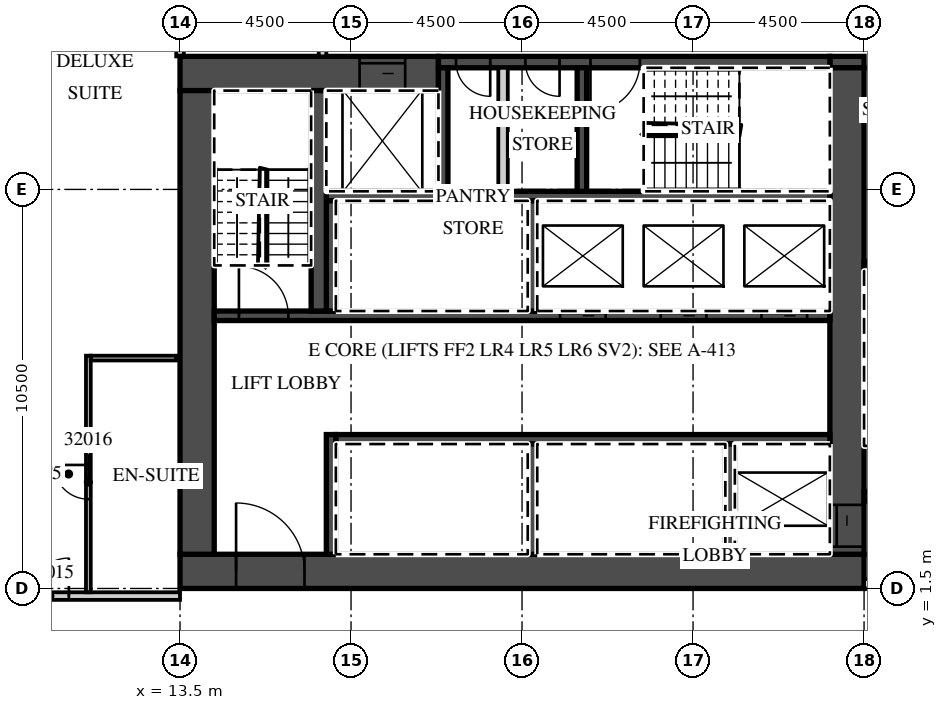
"""IFC4 building model, lengths in metres.
Left out: names, types, materials, properties, quantities, classifications, styles, units other than length and angle.
Written with IfcOpenShell. Run it as: python <this file> out.ifc"""

import sys

from ifc_helpers import new_model, si_unit, direction, frame, frame_2d, origin, place, context, subcontext, project, spatial, rectangle, extrude, element, fill, save


model = new_model("IFC4")
c1 = context("Model", 3, precision=1e-05, world=origin(), true_north=direction((0.0, 1.0)))
c2 = subcontext(c1, "Body", "Model", "MODEL_VIEW")
j1 = project(units=[si_unit("LENGTHUNIT", "METRE"), si_unit("PLANEANGLEUNIT", "RADIAN")], contexts=[c1])
p1 = place(None, origin())
s1 = spatial("IfcSite", under=j1, at=p1, CompositionType="ELEMENT")
p2 = place(p1, origin())
s2 = spatial("IfcBuilding", under=s1, at=p2, CompositionType="ELEMENT")
p3 = place(p2, frame((0.0, 0.0, 140.5)))
s3 = spatial("IfcBuildingStorey", under=s2, at=p3, CompositionType="ELEMENT", Elevation=140.5)
p4 = place(p3, frame((13.5, 15.5, 0.0), z_axis=(0.0, 0.0, 1.0), x_axis=(0.0, 1.0, 0.0)))
e1 = element("IfcWall", 1, at=p4, inside=s3, PredefinedType="PARTITIONING", context=c2, shape_type="SweptSolid", body=[
    extrude(rectangle(XDim=7.162, YDim=0.2, at=frame_2d((3.581, 0.0))), origin(), (0.0, 0.0, 1.0), 3.02),
])
p5 = place(p3, frame((-39.316, 1.3, 0.0), z_axis=(0.0, 0.0, 1.0), x_axis=(1.0, 0.0, 0.0)))
e2 = element("IfcWall", 2, at=p5, inside=s3, PredefinedType="PARTITIONING", context=c2, shape_type="SweptSolid", body=[
    extrude(rectangle(XDim=52.816, YDim=0.2, at=frame_2d((26.408, 0.0))), origin(), (0.0, 0.0, 1.0), 3.02),
])
p6 = place(p5, frame((0.15, 0.0, 0.0)))
e3 = element("IfcOpeningElement", 3, at=p6, cuts=e2, PredefinedType="OPENING", context=c2, shape_type="SweptSolid", body=[
    extrude(rectangle(XDim=0.9, YDim=2.1, at=frame_2d((0.45, 1.05))), frame((0.0, 0.11, 0.0), z_axis=(0.0, -1.0, 0.0), x_axis=(1.0, 0.0, 0.0)), (0.0, 0.0, 1.0), 0.22),
])
p7 = place(p5, frame((8.679, 0.0, 0.0)))
e4 = element("IfcOpeningElement", 4, at=p7, cuts=e2, PredefinedType="OPENING", context=c2, shape_type="SweptSolid", body=[
    extrude(rectangle(XDim=1.2, YDim=2.1, at=frame_2d((0.6, 1.05))), frame((0.0, 0.11, 0.0), z_axis=(0.0, -1.0, 0.0), x_axis=(1.0, 0.0, 0.0)), (0.0, 0.0, 1.0), 0.22),
])
p8 = place(p5, frame((17.678, 0.0, 0.0)))
e5 = element("IfcOpeningElement", 5, at=p8, cuts=e2, PredefinedType="OPENING", context=c2, shape_type="SweptSolid", body=[
    extrude(rectangle(XDim=1.2, YDim=2.1, at=frame_2d((0.6, 1.05))), frame((0.0, 0.11, 0.0), z_axis=(0.0, -1.0, 0.0), x_axis=(1.0, 0.0, 0.0)), (0.0, 0.0, 1.0), 0.22),
])
p9 = place(p5, frame((23.754, 0.0, 0.0)))
e6 = element("IfcOpeningElement", 6, at=p9, cuts=e2, PredefinedType="OPENING", context=c2, shape_type="SweptSolid", body=[
    extrude(rectangle(XDim=1.2, YDim=2.1, at=frame_2d((0.6, 1.05))), frame((0.0, 0.11, 0.0), z_axis=(0.0, -1.0, 0.0), x_axis=(1.0, 0.0, 0.0)), (0.0, 0.0, 1.0), 0.22),
])
p10 = place(p5, frame((30.891, 0.0, 0.0)))
e7 = element("IfcOpeningElement", 7, at=p10, cuts=e2, PredefinedType="OPENING", context=c2, shape_type="SweptSolid", body=[
    extrude(rectangle(XDim=1.0, YDim=2.1, at=frame_2d((0.5, 1.05))), frame((0.0, 0.11, 0.0), z_axis=(0.0, -1.0, 0.0), x_axis=(1.0, 0.0, 0.0)), (0.0, 0.0, 1.0), 0.22),
])
p11 = place(p5, frame((37.741, 0.0, 0.0)))
e8 = element("IfcOpeningElement", 8, at=p11, cuts=e2, PredefinedType="OPENING", context=c2, shape_type="SweptSolid", body=[
    extrude(rectangle(XDim=1.0, YDim=2.1, at=frame_2d((0.5, 1.05))), frame((0.0, 0.11, 0.0), z_axis=(0.0, -1.0, 0.0), x_axis=(1.0, 0.0, 0.0)), (0.0, 0.0, 1.0), 0.22),
])
p12 = place(p5, frame((41.754, 0.0, 0.0)))
e9 = element("IfcOpeningElement", 9, at=p12, cuts=e2, PredefinedType="OPENING", context=c2, shape_type="SweptSolid", body=[
    extrude(rectangle(XDim=1.2, YDim=2.1, at=frame_2d((0.6, 1.05))), frame((0.0, 0.11, 0.0), z_axis=(0.0, -1.0, 0.0), x_axis=(1.0, 0.0, 0.0)), (0.0, 0.0, 1.0), 0.22),
])
p13 = place(p5, frame((48.891, 0.0, 0.0)))
e10 = element("IfcOpeningElement", 10, at=p13, cuts=e2, PredefinedType="OPENING", context=c2, shape_type="SweptSolid", body=[
    extrude(rectangle(XDim=1.0, YDim=2.1, at=frame_2d((0.5, 1.05))), frame((0.0, 0.11, 0.0), z_axis=(0.0, -1.0, 0.0), x_axis=(1.0, 0.0, 0.0)), (0.0, 0.0, 1.0), 0.22),
])
p14 = place(p3, frame((11.088, 1.4, 0.0), z_axis=(0.0, 0.0, 1.0), x_axis=(0.0, 1.0, 0.0)))
e11 = element("IfcWall", 11, at=p14, inside=s3, PredefinedType="PARTITIONING", context=c2, shape_type="SweptSolid", body=[
    extrude(rectangle(XDim=6.225, YDim=0.125, at=frame_2d((3.113, 0.0))), origin(), (0.0, 0.0, 1.0), 3.02),
])
p15 = place(p14, frame((2.45, 0.0, 0.0)))
e12 = element("IfcOpeningElement", 12, at=p15, cuts=e11, PredefinedType="OPENING", context=c2, shape_type="SweptSolid", body=[
    extrude(rectangle(XDim=0.9, YDim=2.1, at=frame_2d((0.45, 1.05))), frame((0.0, 0.073, 0.0), z_axis=(0.0, -1.0, 0.0), x_axis=(1.0, 0.0, 0.0)), (0.0, 0.0, 1.0), 0.145),
])
p16 = place(p3, frame((11.15, 7.562, 0.0), z_axis=(0.0, 0.0, 1.0), x_axis=(1.0, 0.0, 0.0)))
e13 = element("IfcWall", 13, at=p16, inside=s3, PredefinedType="PARTITIONING", context=c2, shape_type="SweptSolid", body=[
    extrude(rectangle(XDim=2.25, YDim=0.125, at=frame_2d((1.125, 0.0))), origin(), (0.0, 0.0, 1.0), 3.02),
])
p17 = place(p3, frame((13.5, 1.95, 0.0), z_axis=(0.0, 0.0, 1.0), x_axis=(1.0, 0.0, 0.0)))
e14 = element("IfcWall", 14, at=p17, inside=s3, PredefinedType="SHEAR", context=c2, shape_type="SweptSolid", body=[
    extrude(rectangle(XDim=18.0, YDim=0.9, at=frame_2d((9.0, 0.0))), origin(), (0.0, 0.0, 1.0), 3.02),
])
p18 = place(p17, frame((1.475, 0.0, 0.0)))
e15 = element("IfcOpeningElement", 15, at=p18, cuts=e14, PredefinedType="OPENING", context=c2, shape_type="SweptSolid", body=[
    extrude(rectangle(XDim=1.8, YDim=2.1, at=frame_2d((0.9, 1.05))), frame((0.0, 0.46, 0.0), z_axis=(0.0, -1.0, 0.0), x_axis=(1.0, 0.0, 0.0)), (0.0, 0.0, 1.0), 0.92),
])
p19 = place(p3, frame((13.5, 15.05, 0.0), z_axis=(0.0, 0.0, 1.0), x_axis=(1.0, 0.0, 0.0)))
e16 = element("IfcWall", 16, at=p19, inside=s3, PredefinedType="SHEAR", context=c2, shape_type="SweptSolid", body=[
    extrude(rectangle(XDim=6.8, YDim=0.9, at=frame_2d((3.4, 0.0))), origin(), (0.0, 0.0, 1.0), 3.02),
])
p20 = place(p19, frame((4.725, 0.0, 0.0)))
e17 = element("IfcOpeningElement", 17, at=p20, cuts=e16, PredefinedType="OPENING", context=c2, shape_type="SweptSolid", body=[
    extrude(rectangle(XDim=1.2, YDim=2.1, at=frame_2d((0.6, 1.05))), frame((0.0, 0.46, 0.0), z_axis=(0.0, -1.0, 0.0), x_axis=(1.0, 0.0, 0.0)), (0.0, 0.0, 1.0), 0.92),
])
p21 = place(p3, frame((30.6, 15.35, 0.0), z_axis=(0.0, 0.0, 1.0), x_axis=(1.0, 0.0, 0.0)))
e18 = element("IfcWall", 18, at=p21, inside=s3, PredefinedType="SHEAR", context=c2, shape_type="SweptSolid", body=[
    extrude(rectangle(XDim=0.9, YDim=0.3, at=frame_2d((0.45, 0.0))), origin(), (0.0, 0.0, 1.0), 3.02),
])
p22 = place(p3, frame((20.3, 15.35, 0.0), z_axis=(0.0, 0.0, 1.0), x_axis=(1.0, 0.0, 0.0)))
e19 = element("IfcWall", 19, at=p22, inside=s3, PredefinedType="SHEAR", context=c2, shape_type="SweptSolid", body=[
    extrude(rectangle(XDim=10.3, YDim=0.3, at=frame_2d((5.15, 0.0))), origin(), (0.0, 0.0, 1.0), 3.02),
])
p23 = place(p22, frame((4.0, 0.0, 0.0)))
e20 = element("IfcOpeningElement", 20, at=p23, cuts=e19, PredefinedType="OPENING", context=c2, shape_type="SweptSolid", body=[
    extrude(rectangle(XDim=1.3, YDim=2.1, at=frame_2d((0.65, 1.05))), frame((0.0, 0.16, 0.0), z_axis=(0.0, -1.0, 0.0), x_axis=(1.0, 0.0, 0.0)), (0.0, 0.0, 1.0), 0.32),
])
p24 = place(p22, frame((2.288, 0.0, 0.0)))
e21 = element("IfcOpeningElement", 21, at=p24, cuts=e19, PredefinedType="OPENING", context=c2, shape_type="SweptSolid", body=[
    extrude(rectangle(XDim=0.9, YDim=2.1, at=frame_2d((0.45, 1.05))), frame((0.0, 0.16, 0.0), z_axis=(0.0, -1.0, 0.0), x_axis=(1.0, 0.0, 0.0)), (0.0, 0.0, 1.0), 0.32),
])
p25 = place(p22, frame((0.462, 0.0, 0.0)))
e22 = element("IfcOpeningElement", 22, at=p25, cuts=e19, PredefinedType="OPENING", context=c2, shape_type="SweptSolid", body=[
    extrude(rectangle(XDim=0.9, YDim=2.1, at=frame_2d((0.45, 1.05))), frame((0.0, 0.16, 0.0), z_axis=(0.0, -1.0, 0.0), x_axis=(1.0, 0.0, 0.0)), (0.0, 0.0, 1.0), 0.32),
])
p26 = place(p3, frame((31.05, 2.4, 0.0), z_axis=(0.0, 0.0, 1.0), x_axis=(0.0, 1.0, 0.0)))
e23 = element("IfcWall", 23, at=p26, inside=s3, PredefinedType="SHEAR", context=c2, shape_type="SweptSolid", body=[
    extrude(rectangle(XDim=12.8, YDim=0.9, at=frame_2d((6.4, 0.0))), origin(), (0.0, 0.0, 1.0), 3.02),
])
p27 = place(p26, frame((0.2, 0.0, 0.0)))
e24 = element("IfcOpeningElement", 24, at=p27, cuts=e23, PredefinedType="OPENING", context=c2, shape_type="SweptSolid", body=[
    extrude(rectangle(XDim=1.1, YDim=2.1, at=frame_2d((0.55, 1.05))), frame((0.0, 0.46, 0.0), z_axis=(0.0, -1.0, 0.0), x_axis=(1.0, 0.0, 0.0)), (0.0, 0.0, 1.0), 0.92),
])
p28 = place(p3, frame((13.95, 2.4, 0.0), z_axis=(0.0, 0.0, 1.0), x_axis=(0.0, 1.0, 0.0)))
e25 = element("IfcWall", 25, at=p28, inside=s3, PredefinedType="SHEAR", context=c2, shape_type="SweptSolid", body=[
    extrude(rectangle(XDim=12.2, YDim=0.9, at=frame_2d((6.1, 0.0))), origin(), (0.0, 0.0, 1.0), 3.02),
])
p29 = place(p3, frame((17.6, 5.425, 0.0), z_axis=(0.0, 0.0, 1.0), x_axis=(1.0, 0.0, 0.0)))
e26 = element("IfcWall", 26, at=p29, inside=s3, PredefinedType="SHEAR", context=c2, shape_type="SweptSolid", body=[
    extrude(rectangle(XDim=13.0, YDim=0.25, at=frame_2d((6.5, 0.0))), origin(), (0.0, 0.0, 1.0), 3.02),
])
p30 = place(p3, frame((17.475, 2.4, 0.0), z_axis=(0.0, 0.0, 1.0), x_axis=(0.0, 1.0, 0.0)))
e27 = element("IfcWall", 27, at=p30, inside=s3, PredefinedType="SHEAR", context=c2, shape_type="SweptSolid", body=[
    extrude(rectangle(XDim=3.15, YDim=0.25, at=frame_2d((1.575, 0.0))), origin(), (0.0, 0.0, 1.0), 3.02),
])
for number, where, z_axis, x_axis in (
    (28, (27.975, 2.4, 0.0), (0.0, 0.0, 1.0), (0.0, 1.0, 0.0)),
    (29, (22.775, 2.4, 0.0), (0.0, 0.0, 1.0), (0.0, 1.0, 0.0)),
):
    element("IfcWall", number, at=place(p3, frame(where, z_axis=z_axis, x_axis=x_axis)), inside=s3, PredefinedType="SHEAR", context=c2, shape_type="SweptSolid", body=[
        extrude(rectangle(XDim=2.9, YDim=0.25, at=frame_2d((1.45, 0.0))), origin(), (0.0, 0.0, 1.0), 3.02),
    ])
p31 = place(p3, frame((14.4, 8.675, 0.0), z_axis=(0.0, 0.0, 1.0), x_axis=(1.0, 0.0, 0.0)))
e30 = element("IfcWall", 30, at=p31, inside=s3, PredefinedType="SHEAR", context=c2, shape_type="SweptSolid", body=[
    extrude(rectangle(XDim=16.2, YDim=0.25, at=frame_2d((8.1, 0.0))), origin(), (0.0, 0.0, 1.0), 3.02),
])
p32 = place(p31, frame((14.4, 0.0, 0.0)))
e31 = element("IfcOpeningElement", 31, at=p32, cuts=e30, PredefinedType="OPENING", context=c2, shape_type="SweptSolid", body=[
    extrude(rectangle(XDim=1.2, YDim=2.1, at=frame_2d((0.6, 1.05))), frame((0.0, 0.135, 0.0), z_axis=(0.0, -1.0, 0.0), x_axis=(1.0, 0.0, 0.0)), (0.0, 0.0, 1.0), 0.27),
])
p33 = place(p31, frame((11.75, 0.0, 0.0)))
e32 = element("IfcOpeningElement", 32, at=p33, cuts=e30, PredefinedType="OPENING", context=c2, shape_type="SweptSolid", body=[
    extrude(rectangle(XDim=1.2, YDim=2.1, at=frame_2d((0.6, 1.05))), frame((0.0, 0.135, 0.0), z_axis=(0.0, -1.0, 0.0), x_axis=(1.0, 0.0, 0.0)), (0.0, 0.0, 1.0), 0.27),
])
p34 = place(p31, frame((9.1, 0.0, 0.0)))
e33 = element("IfcOpeningElement", 33, at=p34, cuts=e30, PredefinedType="OPENING", context=c2, shape_type="SweptSolid", body=[
    extrude(rectangle(XDim=1.2, YDim=2.1, at=frame_2d((0.6, 1.05))), frame((0.0, 0.135, 0.0), z_axis=(0.0, -1.0, 0.0), x_axis=(1.0, 0.0, 0.0)), (0.0, 0.0, 1.0), 0.27),
])
p35 = place(p31, frame((0.65, 0.0, 0.0)))
e34 = element("IfcOpeningElement", 34, at=p35, cuts=e30, PredefinedType="OPENING", context=c2, shape_type="SweptSolid", body=[
    extrude(rectangle(XDim=1.3, YDim=2.1, at=frame_2d((0.65, 1.05))), frame((0.0, 0.135, 0.0), z_axis=(0.0, -1.0, 0.0), x_axis=(1.0, 0.0, 0.0)), (0.0, 0.0, 1.0), 0.27),
])
p36 = place(p3, frame((17.35, 11.825, 0.0), z_axis=(0.0, 0.0, 1.0), x_axis=(1.0, 0.0, 0.0)))
e35 = element("IfcWall", 35, at=p36, inside=s3, PredefinedType="SHEAR", context=c2, shape_type="SweptSolid", body=[
    extrude(rectangle(XDim=13.25, YDim=0.25, at=frame_2d((6.625, 0.0))), origin(), (0.0, 0.0, 1.0), 3.02),
])
for number, where, z_axis, x_axis in (
    (36, (17.475, 8.8, 0.0), (0.0, 0.0, 1.0), (0.0, 1.0, 0.0)),
    (37, (22.775, 8.8, 0.0), (0.0, 0.0, 1.0), (0.0, 1.0, 0.0)),
):
    element("IfcWall", number, at=place(p3, frame(where, z_axis=z_axis, x_axis=x_axis)), inside=s3, PredefinedType="SHEAR", context=c2, shape_type="SweptSolid", body=[
        extrude(rectangle(XDim=2.9, YDim=0.25, at=frame_2d((1.45, 0.0))), origin(), (0.0, 0.0, 1.0), 3.02),
    ])
p37 = place(p3, frame((17.15, 8.8, 0.0), z_axis=(0.0, 0.0, 1.0), x_axis=(0.0, 1.0, 0.0)))
e38 = element("IfcWall", 38, at=p37, inside=s3, PredefinedType="SHEAR", context=c2, shape_type="SweptSolid", body=[
    extrude(rectangle(XDim=5.8, YDim=0.4, at=frame_2d((2.9, 0.0))), origin(), (0.0, 0.0, 1.0), 3.02),
])
for number, where, z_axis, x_axis in (
    (39, (20.425, 11.95, 0.0), (0.0, 0.0, 1.0), (0.0, 1.0, 0.0)),
    (40, (24.075, 11.95, 0.0), (0.0, 0.0, 1.0), (0.0, 1.0, 0.0)),
):
    element("IfcWall", number, at=place(p3, frame(where, z_axis=z_axis, x_axis=x_axis)), inside=s3, PredefinedType="SHEAR", context=c2, shape_type="SweptSolid", body=[
        extrude(rectangle(XDim=3.25, YDim=0.25, at=frame_2d((1.625, 0.0))), origin(), (0.0, 0.0, 1.0), 3.02),
    ])
p38 = place(p3, frame((22.0, 11.95, 0.0), z_axis=(0.0, 0.0, 1.0), x_axis=(0.0, 1.0, 0.0)))
e41 = element("IfcWall", 41, at=p38, inside=s3, PredefinedType="PARTITIONING", context=c2, shape_type="SweptSolid", body=[
    extrude(rectangle(XDim=3.25, YDim=0.25, at=frame_2d((1.625, 0.0))), origin(), (0.0, 0.0, 1.0), 3.02),
])
p39 = place(p3, frame((31.5, 1.625, 0.0), z_axis=(0.0, 0.0, 1.0), x_axis=(1.0, 0.0, 0.0)))
e42 = element("IfcWall", 42, at=p39, inside=s3, PredefinedType="PARTITIONING", context=c2, shape_type="SweptSolid", body=[
    extrude(rectangle(XDim=15.65, YDim=0.25, at=frame_2d((7.825, 0.0))), origin(), (0.0, 0.0, 1.0), 3.02),
])
p40 = place(p39, frame((0.625, 0.0, 0.0)))
e43 = element("IfcOpeningElement", 43, at=p40, cuts=e42, PredefinedType="OPENING", context=c2, shape_type="SweptSolid", body=[
    extrude(rectangle(XDim=1.3, YDim=2.1, at=frame_2d((0.65, 1.05))), frame((0.0, 0.135, 0.0), z_axis=(0.0, -1.0, 0.0), x_axis=(1.0, 0.0, 0.0)), (0.0, 0.0, 1.0), 0.27),
])
p41 = place(p39, frame((3.25, 0.0, 0.0)))
e44 = element("IfcOpeningElement", 44, at=p41, cuts=e42, PredefinedType="OPENING", context=c2, shape_type="SweptSolid", body=[
    extrude(rectangle(XDim=1.1, YDim=2.1, at=frame_2d((0.55, 1.05))), frame((0.0, 0.135, 0.0), z_axis=(0.0, -1.0, 0.0), x_axis=(1.0, 0.0, 0.0)), (0.0, 0.0, 1.0), 0.27),
])
p42 = place(p3, frame((31.5, 3.925, 0.0), z_axis=(0.0, 0.0, 1.0), x_axis=(1.0, 0.0, 0.0)))
e45 = element("IfcWall", 45, at=p42, inside=s3, PredefinedType="SHEAR", context=c2, shape_type="SweptSolid", body=[
    extrude(rectangle(XDim=2.55, YDim=0.25, at=frame_2d((1.275, 0.0))), origin(), (0.0, 0.0, 1.0), 3.02),
])
p43 = place(p42, frame((0.625, 0.0, 0.0)))
e46 = element("IfcOpeningElement", 46, at=p43, cuts=e45, PredefinedType="OPENING", context=c2, shape_type="SweptSolid", body=[
    extrude(rectangle(XDim=1.3, YDim=2.1, at=frame_2d((0.65, 1.05))), frame((0.0, 0.135, 0.0), z_axis=(0.0, -1.0, 0.0), x_axis=(1.0, 0.0, 0.0)), (0.0, 0.0, 1.0), 0.27),
])
p44 = place(p3, frame((31.5, 9.975, 0.0), z_axis=(0.0, 0.0, 1.0), x_axis=(1.0, 0.0, 0.0)))
e47 = element("IfcWall", 47, at=p44, inside=s3, PredefinedType="SHEAR", context=c2, shape_type="SweptSolid", body=[
    extrude(rectangle(XDim=2.55, YDim=0.25, at=frame_2d((1.275, 0.0))), origin(), (0.0, 0.0, 1.0), 3.02),
])
p45 = place(p3, frame((17.25, 15.5, 0.0), z_axis=(0.0, 0.0, 1.0), x_axis=(0.0, 1.0, 0.0)))
e48 = element("IfcWall", 48, at=p45, inside=s3, PredefinedType="PARTITIONING", context=c2, shape_type="SweptSolid", body=[
    extrude(rectangle(XDim=2.2, YDim=0.2, at=frame_2d((1.1, 0.0))), origin(), (0.0, 0.0, 1.0), 3.02),
])
p46 = place(p13, origin())
e49 = element("IfcDoor", 49, at=p46, inside=s3, OperationType="SINGLE_SWING_RIGHT", PredefinedType="DOOR", context=c2, shape_type="SweptSolid", body=[
    extrude(rectangle(XDim=1.0, YDim=2.1, at=frame_2d((0.5, 1.05))), frame((0.0, 0.025, 0.0), z_axis=(0.0, -1.0, 0.0), x_axis=(1.0, 0.0, 0.0)), (0.0, 0.0, 1.0), 0.05),
])
fill(e10, e49)
p47 = place(p15, origin())
e50 = element("IfcDoor", 50, at=p47, inside=s3, OperationType="SINGLE_SWING_RIGHT", PredefinedType="DOOR", context=c2, shape_type="SweptSolid", body=[
    extrude(rectangle(XDim=0.9, YDim=2.1, at=frame_2d((0.45, 1.05))), frame((0.0, 0.025, 0.0), z_axis=(0.0, -1.0, 0.0), x_axis=(1.0, 0.0, 0.0)), (0.0, 0.0, 1.0), 0.05),
])
fill(e12, e50)
p48 = place(p32, origin())
e51 = element("IfcDoor", 51, at=p48, inside=s3, OperationType="SLIDING_TO_LEFT", PredefinedType="DOOR", context=c2, shape_type="SweptSolid", body=[
    extrude(rectangle(XDim=1.2, YDim=2.1, at=frame_2d((0.6, 1.05))), frame((0.0, 0.025, 0.0), z_axis=(0.0, -1.0, 0.0), x_axis=(1.0, 0.0, 0.0)), (0.0, 0.0, 1.0), 0.05),
])
fill(e31, e51)
p49 = place(p33, origin())
e52 = element("IfcDoor", 52, at=p49, inside=s3, OperationType="SLIDING_TO_RIGHT", PredefinedType="DOOR", context=c2, shape_type="SweptSolid", body=[
    extrude(rectangle(XDim=1.2, YDim=2.1, at=frame_2d((0.6, 1.05))), frame((0.0, 0.025, 0.0), z_axis=(0.0, -1.0, 0.0), x_axis=(1.0, 0.0, 0.0)), (0.0, 0.0, 1.0), 0.05),
])
fill(e32, e52)
p50 = place(p34, origin())
e53 = element("IfcDoor", 53, at=p50, inside=s3, OperationType="SLIDING_TO_RIGHT", PredefinedType="DOOR", context=c2, shape_type="SweptSolid", body=[
    extrude(rectangle(XDim=1.2, YDim=2.1, at=frame_2d((0.6, 1.05))), frame((0.0, 0.025, 0.0), z_axis=(0.0, -1.0, 0.0), x_axis=(1.0, 0.0, 0.0)), (0.0, 0.0, 1.0), 0.05),
])
fill(e33, e53)
p51 = place(p20, origin())
e54 = element("IfcDoor", 54, at=p51, inside=s3, OperationType="SLIDING_TO_LEFT", PredefinedType="DOOR", context=c2, shape_type="SweptSolid", body=[
    extrude(rectangle(XDim=1.2, YDim=2.1, at=frame_2d((0.6, 1.05))), frame((0.0, 0.025, 0.0), z_axis=(0.0, -1.0, 0.0), x_axis=(1.0, 0.0, 0.0)), (0.0, 0.0, 1.0), 0.05),
])
fill(e17, e54)
p52 = place(p27, origin())
e55 = element("IfcDoor", 55, at=p52, inside=s3, OperationType="SLIDING_TO_LEFT", PredefinedType="DOOR", context=c2, shape_type="SweptSolid", body=[
    extrude(rectangle(XDim=1.1, YDim=2.1, at=frame_2d((0.55, 1.05))), frame((0.0, 0.025, 0.0), z_axis=(0.0, -1.0, 0.0), x_axis=(1.0, 0.0, 0.0)), (0.0, 0.0, 1.0), 0.05),
])
fill(e24, e55)
p53 = place(p18, origin())
e56 = element("IfcDoor", 56, at=p53, inside=s3, OperationType="DOUBLE_DOOR_DOUBLE_SWING", PredefinedType="DOOR", context=c2, shape_type="SweptSolid", body=[
    extrude(rectangle(XDim=1.8, YDim=2.1, at=frame_2d((0.9, 1.05))), frame((0.0, 0.025, 0.0), z_axis=(0.0, -1.0, 0.0), x_axis=(1.0, 0.0, 0.0)), (0.0, 0.0, 1.0), 0.05),
])
fill(e15, e56)
p54 = place(p35, origin())
e57 = element("IfcDoor", 57, at=p54, inside=s3, OperationType="SINGLE_SWING_LEFT", PredefinedType="DOOR", context=c2, shape_type="SweptSolid", body=[
    extrude(rectangle(XDim=1.3, YDim=2.1, at=frame_2d((0.65, 1.05))), frame((0.0, 0.025, 0.0), z_axis=(0.0, -1.0, 0.0), x_axis=(1.0, 0.0, 0.0)), (0.0, 0.0, 1.0), 0.05),
])
fill(e34, e57)
p55 = place(p23, origin())
e58 = element("IfcDoor", 58, at=p55, inside=s3, OperationType="SINGLE_SWING_LEFT", PredefinedType="DOOR", context=c2, shape_type="SweptSolid", body=[
    extrude(rectangle(XDim=1.3, YDim=2.1, at=frame_2d((0.65, 1.05))), frame((0.0, 0.025, 0.0), z_axis=(0.0, -1.0, 0.0), x_axis=(1.0, 0.0, 0.0)), (0.0, 0.0, 1.0), 0.05),
])
fill(e20, e58)
p56 = place(p24, origin())
e59 = element("IfcDoor", 59, at=p56, inside=s3, OperationType="SINGLE_SWING_RIGHT", PredefinedType="DOOR", context=c2, shape_type="SweptSolid", body=[
    extrude(rectangle(XDim=0.9, YDim=2.1, at=frame_2d((0.45, 1.05))), frame((0.0, 0.025, 0.0), z_axis=(0.0, -1.0, 0.0), x_axis=(1.0, 0.0, 0.0)), (0.0, 0.0, 1.0), 0.05),
])
fill(e21, e59)
p57 = place(p25, origin())
e60 = element("IfcDoor", 60, at=p57, inside=s3, OperationType="SINGLE_SWING_RIGHT", PredefinedType="DOOR", context=c2, shape_type="SweptSolid", body=[
    extrude(rectangle(XDim=0.9, YDim=2.1, at=frame_2d((0.45, 1.05))), frame((0.0, 0.025, 0.0), z_axis=(0.0, -1.0, 0.0), x_axis=(1.0, 0.0, 0.0)), (0.0, 0.0, 1.0), 0.05),
])
fill(e22, e60)
save(model, sys.argv[1])
